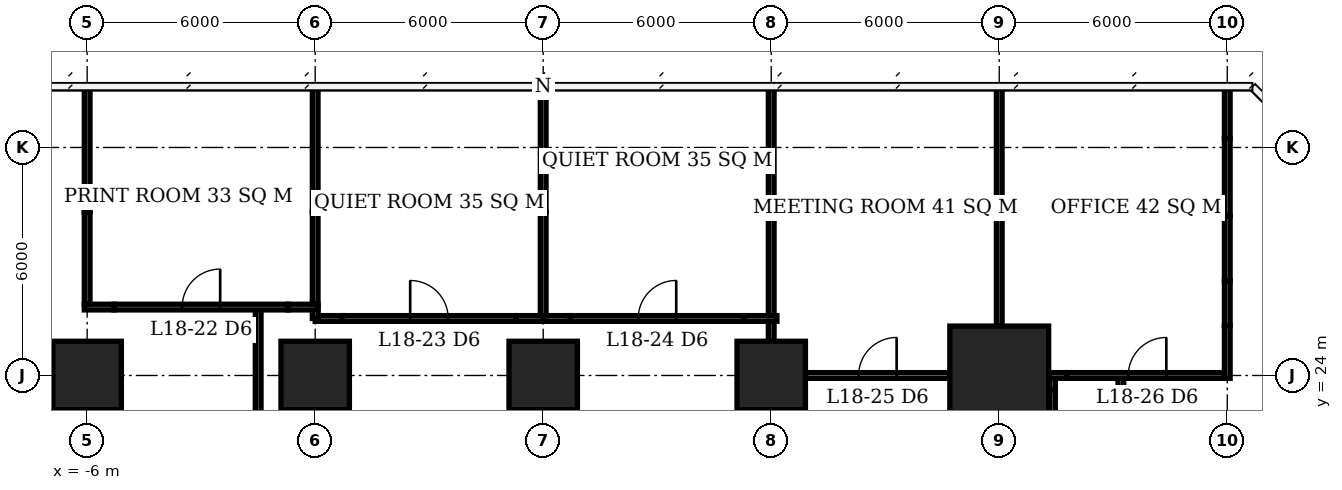
"""IFC4 building model, lengths in metres.
Left out: names, types, materials, properties, quantities, classifications, styles, units other than length and angle.
Written with IfcOpenShell. Run it as: python <this file> out.ifc"""

import sys

from ifc_helpers import new_model, si_unit, direction, frame, frame_2d, origin, origin_2d, place, context, subcontext, project, spatial, rectangle, extrude, element, fill, save


model = new_model("IFC4")
c1 = context("Model", 3, precision=1e-05, world=origin(), true_north=direction((0.0, 1.0)))
c2 = subcontext(c1, "Body", "Model", "MODEL_VIEW")
j1 = project(units=[si_unit("LENGTHUNIT", "METRE"), si_unit("PLANEANGLEUNIT", "RADIAN")], contexts=[c1])
p1 = place(None, origin())
s1 = spatial("IfcSite", under=j1, at=p1, CompositionType="ELEMENT")
p2 = place(p1, origin())
s2 = spatial("IfcBuilding", under=s1, at=p2, CompositionType="ELEMENT")
p3 = place(p2, frame((0.0, 0.0, 76.7)))
s3 = spatial("IfcBuildingStorey", under=s2, at=p3, CompositionType="ELEMENT", Elevation=76.7)
for number, where, z_axis, x_axis in (
    (1, (-6.0, 24.0, 0.0), (0.0, 0.0, 1.0), (1.0, 0.0, 0.0)),
    (2, (0.0, 24.0, 0.0), (0.0, 0.0, 1.0), (1.0, 0.0, 0.0)),
    (3, (6.0, 24.0, 0.0), (0.0, 0.0, 1.0), (1.0, 0.0, 0.0)),
    (4, (12.0, 24.0, 0.0), (0.0, 0.0, 1.0), (1.0, 0.0, 0.0)),
):
    element("IfcColumn", number, at=place(p3, frame(where, z_axis=z_axis, x_axis=x_axis)), inside=s3, PredefinedType="COLUMN", context=c2, shape_type="SweptSolid", body=[
        extrude(rectangle(XDim=1.8, YDim=1.8, at=origin_2d()), origin(), (0.0, 0.0, 1.0), 3.9),
    ])
p4 = place(p3, frame((18.0, 24.0, 0.0), z_axis=(0.0, 0.0, 1.0), x_axis=(1.0, 0.0, 0.0)))
e5 = element("IfcColumn", 5, at=p4, inside=s3, PredefinedType="COLUMN", context=c2, shape_type="SweptSolid", body=[
    extrude(rectangle(XDim=2.6, YDim=2.6, at=origin_2d()), origin(), (0.0, 0.0, 1.0), 3.9),
])
p5 = place(p3, frame((12.9, 24.0, 0.0), z_axis=(0.0, 0.0, 1.0), x_axis=(1.0, 0.0, 0.0)))
e6 = element("IfcWall", 6, at=p5, inside=s3, PredefinedType="PARTITIONING", context=c2, shape_type="SweptSolid", body=[
    extrude(rectangle(XDim=3.8, YDim=0.15, at=frame_2d((1.9, 0.0))), origin(), (0.0, 0.0, 1.0), 3.65),
])
p6 = place(p5, frame((1.4, 0.0, 0.0)))
e7 = element("IfcOpeningElement", 7, at=p6, cuts=e6, PredefinedType="OPENING", context=c2, shape_type="SweptSolid", body=[
    extrude(rectangle(XDim=1.0, YDim=2.1, at=frame_2d((0.5, 1.05))), frame((0.0, 0.085, 0.0), z_axis=(0.0, -1.0, 0.0), x_axis=(1.0, 0.0, 0.0)), (0.0, 0.0, 1.0), 0.17),
])
p7 = place(p3, frame((19.3, 24.0, 0.0), z_axis=(0.0, 0.0, 1.0), x_axis=(1.0, 0.0, 0.0)))
e8 = element("IfcWall", 8, at=p7, inside=s3, PredefinedType="PARTITIONING", context=c2, shape_type="SweptSolid", body=[
    extrude(rectangle(XDim=0.492, YDim=0.15, at=frame_2d((0.246, 0.0))), origin(), (0.0, 0.0, 1.0), 2.65),
])
p8 = place(p3, frame((19.792, 24.0, 0.0), z_axis=(0.0, 0.0, 1.0), x_axis=(1.0, 0.0, 0.0)))
e9 = element("IfcWall", 9, at=p8, inside=s3, PredefinedType="PARTITIONING", context=c2, shape_type="SweptSolid", body=[
    extrude(rectangle(XDim=4.133, YDim=0.15, at=frame_2d((2.066, 0.0))), origin(), (0.0, 0.0, 1.0), 3.65),
])
p9 = place(p8, frame((1.604, 0.0, 0.0)))
e10 = element("IfcOpeningElement", 10, at=p9, cuts=e9, PredefinedType="OPENING", context=c2, shape_type="SweptSolid", body=[
    extrude(rectangle(XDim=1.0, YDim=2.1, at=frame_2d((0.5, 1.05))), frame((0.0, 0.085, 0.0), z_axis=(0.0, -1.0, 0.0), x_axis=(1.0, 0.0, 0.0)), (0.0, 0.0, 1.0), 0.17),
])
p10 = place(p3, frame((0.0, 25.5, 0.0), z_axis=(0.0, 0.0, 1.0), x_axis=(1.0, 0.0, 0.0)))
e11 = element("IfcWall", 11, at=p10, inside=s3, PredefinedType="PARTITIONING", context=c2, shape_type="SweptSolid", body=[
    extrude(rectangle(XDim=0.71, YDim=0.15, at=frame_2d((0.355, 0.0))), origin(), (0.0, 0.0, 1.0), 2.65),
])
p11 = place(p3, frame((0.71, 25.5, 0.0), z_axis=(0.0, 0.0, 1.0), x_axis=(1.0, 0.0, 0.0)))
e12 = element("IfcWall", 12, at=p11, inside=s3, PredefinedType="PARTITIONING", context=c2, shape_type="SweptSolid", body=[
    extrude(rectangle(XDim=4.58, YDim=0.15, at=frame_2d((2.29, 0.0))), origin(), (0.0, 0.0, 1.0), 3.65),
])
p12 = place(p11, frame((1.79, 0.0, 0.0)))
e13 = element("IfcOpeningElement", 13, at=p12, cuts=e12, PredefinedType="OPENING", context=c2, shape_type="SweptSolid", body=[
    extrude(rectangle(XDim=1.0, YDim=2.1, at=frame_2d((0.5, 1.05))), frame((0.0, 0.085, 0.0), z_axis=(0.0, -1.0, 0.0), x_axis=(1.0, 0.0, 0.0)), (0.0, 0.0, 1.0), 0.17),
])
p13 = place(p3, frame((5.29, 25.5, 0.0), z_axis=(0.0, 0.0, 1.0), x_axis=(1.0, 0.0, 0.0)))
e14 = element("IfcWall", 14, at=p13, inside=s3, PredefinedType="PARTITIONING", context=c2, shape_type="SweptSolid", body=[
    extrude(rectangle(XDim=0.785, YDim=0.15, at=frame_2d((0.393, 0.0))), origin(), (0.0, 0.0, 1.0), 2.65),
])
p14 = place(p3, frame((6.0, 25.5, 0.0), z_axis=(0.0, 0.0, 1.0), x_axis=(1.0, 0.0, 0.0)))
e15 = element("IfcWall", 15, at=p14, inside=s3, PredefinedType="PARTITIONING", context=c2, shape_type="SweptSolid", body=[
    extrude(rectangle(XDim=0.71, YDim=0.15, at=frame_2d((0.355, 0.0))), origin(), (0.0, 0.0, 1.0), 2.65),
])
p15 = place(p3, frame((6.71, 25.5, 0.0), z_axis=(0.0, 0.0, 1.0), x_axis=(1.0, 0.0, 0.0)))
e16 = element("IfcWall", 16, at=p15, inside=s3, PredefinedType="PARTITIONING", context=c2, shape_type="SweptSolid", body=[
    extrude(rectangle(XDim=4.58, YDim=0.15, at=frame_2d((2.29, 0.0))), origin(), (0.0, 0.0, 1.0), 3.65),
])
p16 = place(p15, frame((1.79, 0.0, 0.0)))
e17 = element("IfcOpeningElement", 17, at=p16, cuts=e16, PredefinedType="OPENING", context=c2, shape_type="SweptSolid", body=[
    extrude(rectangle(XDim=1.0, YDim=2.1, at=frame_2d((0.5, 1.05))), frame((0.0, 0.085, 0.0), z_axis=(0.0, -1.0, 0.0), x_axis=(1.0, 0.0, 0.0)), (0.0, 0.0, 1.0), 0.17),
])
p17 = place(p3, frame((11.29, 25.5, 0.0), z_axis=(0.0, 0.0, 1.0), x_axis=(1.0, 0.0, 0.0)))
e18 = element("IfcWall", 18, at=p17, inside=s3, PredefinedType="PARTITIONING", context=c2, shape_type="SweptSolid", body=[
    extrude(rectangle(XDim=0.86, YDim=0.15, at=frame_2d((0.43, 0.0))), origin(), (0.0, 0.0, 1.0), 2.65),
])
p18 = place(p3, frame((-6.075, 25.8, 0.0), z_axis=(0.0, 0.0, 1.0), x_axis=(1.0, 0.0, 0.0)))
e19 = element("IfcWall", 19, at=p18, inside=s3, PredefinedType="PARTITIONING", context=c2, shape_type="SweptSolid", body=[
    extrude(rectangle(XDim=0.785, YDim=0.15, at=frame_2d((0.393, 0.0))), origin(), (0.0, 0.0, 1.0), 2.65),
])
p19 = place(p3, frame((-5.29, 25.8, 0.0), z_axis=(0.0, 0.0, 1.0), x_axis=(1.0, 0.0, 0.0)))
e20 = element("IfcWall", 20, at=p19, inside=s3, PredefinedType="PARTITIONING", context=c2, shape_type="SweptSolid", body=[
    extrude(rectangle(XDim=4.58, YDim=0.15, at=frame_2d((2.29, 0.0))), origin(), (0.0, 0.0, 1.0), 3.65),
])
p20 = place(p19, frame((1.79, 0.0, 0.0)))
e21 = element("IfcOpeningElement", 21, at=p20, cuts=e20, PredefinedType="OPENING", context=c2, shape_type="SweptSolid", body=[
    extrude(rectangle(XDim=1.0, YDim=2.1, at=frame_2d((0.5, 1.05))), frame((0.0, 0.085, 0.0), z_axis=(0.0, -1.0, 0.0), x_axis=(1.0, 0.0, 0.0)), (0.0, 0.0, 1.0), 0.17),
])
p21 = place(p3, frame((-0.71, 25.8, 0.0), z_axis=(0.0, 0.0, 1.0), x_axis=(1.0, 0.0, 0.0)))
e22 = element("IfcWall", 22, at=p21, inside=s3, PredefinedType="PARTITIONING", context=c2, shape_type="SweptSolid", body=[
    extrude(rectangle(XDim=0.785, YDim=0.15, at=frame_2d((0.393, 0.0))), origin(), (0.0, 0.0, 1.0), 2.65),
])
p22 = place(p3, frame((-6.0, 25.875, 0.0), z_axis=(0.0, 0.0, 1.0), x_axis=(0.0, 1.0, 0.0)))
e23 = element("IfcWall", 23, at=p22, inside=s3, PredefinedType="PARTITIONING", context=c2, shape_type="SweptSolid", body=[
    extrude(rectangle(XDim=2.435, YDim=0.15, at=frame_2d((1.218, 0.0))), origin(), (0.0, 0.0, 1.0), 2.65),
])
p23 = place(p3, frame((-6.0, 28.31, 0.0), z_axis=(0.0, 0.0, 1.0), x_axis=(0.0, 1.0, 0.0)))
e24 = element("IfcWall", 24, at=p23, inside=s3, PredefinedType="PARTITIONING", context=c2, shape_type="SweptSolid", body=[
    extrude(rectangle(XDim=3.29, YDim=0.15, at=frame_2d((1.645, 0.0))), origin(), (0.0, 0.0, 1.0), 3.65),
])
p24 = place(p3, frame((0.0, 25.5, 0.0), z_axis=(0.0, 0.0, 1.0), x_axis=(0.0, 1.0, 0.0)))
e25 = element("IfcWall", 25, at=p24, inside=s3, PredefinedType="PARTITIONING", context=c2, shape_type="SweptSolid", body=[
    extrude(rectangle(XDim=0.3, YDim=0.15, at=frame_2d((0.15, 0.0))), origin(), (0.0, 0.0, 1.0), 2.65),
])
p25 = place(p3, frame((0.0, 25.875, 0.0), z_axis=(0.0, 0.0, 1.0), x_axis=(0.0, 1.0, 0.0)))
e26 = element("IfcWall", 26, at=p25, inside=s3, PredefinedType="PARTITIONING", context=c2, shape_type="SweptSolid", body=[
    extrude(rectangle(XDim=2.435, YDim=0.15, at=frame_2d((1.218, 0.0))), origin(), (0.0, 0.0, 1.0), 2.65),
])
p26 = place(p3, frame((0.0, 28.31, 0.0), z_axis=(0.0, 0.0, 1.0), x_axis=(0.0, 1.0, 0.0)))
e27 = element("IfcWall", 27, at=p26, inside=s3, PredefinedType="PARTITIONING", context=c2, shape_type="SweptSolid", body=[
    extrude(rectangle(XDim=3.29, YDim=0.15, at=frame_2d((1.645, 0.0))), origin(), (0.0, 0.0, 1.0), 3.65),
])
p27 = place(p3, frame((6.0, 25.575, 0.0), z_axis=(0.0, 0.0, 1.0), x_axis=(0.0, 1.0, 0.0)))
e28 = element("IfcWall", 28, at=p27, inside=s3, PredefinedType="PARTITIONING", context=c2, shape_type="SweptSolid", body=[
    extrude(rectangle(XDim=2.735, YDim=0.15, at=frame_2d((1.368, 0.0))), origin(), (0.0, 0.0, 1.0), 2.65),
])
p28 = place(p3, frame((6.0, 28.31, 0.0), z_axis=(0.0, 0.0, 1.0), x_axis=(0.0, 1.0, 0.0)))
e29 = element("IfcWall", 29, at=p28, inside=s3, PredefinedType="PARTITIONING", context=c2, shape_type="SweptSolid", body=[
    extrude(rectangle(XDim=3.24, YDim=0.15, at=frame_2d((1.62, 0.0))), origin(), (0.0, 0.0, 1.0), 3.65),
])
p29 = place(p3, frame((12.0, 24.9, 0.0), z_axis=(0.0, 0.0, 1.0), x_axis=(0.0, 1.0, 0.0)))
e30 = element("IfcWall", 30, at=p29, inside=s3, PredefinedType="PARTITIONING", context=c2, shape_type="SweptSolid", body=[
    extrude(rectangle(XDim=0.525, YDim=0.15, at=frame_2d((0.263, 0.0))), origin(), (0.0, 0.0, 1.0), 2.65),
])
p30 = place(p3, frame((12.0, 25.575, 0.0), z_axis=(0.0, 0.0, 1.0), x_axis=(0.0, 1.0, 0.0)))
e31 = element("IfcWall", 31, at=p30, inside=s3, PredefinedType="PARTITIONING", context=c2, shape_type="SweptSolid", body=[
    extrude(rectangle(XDim=2.735, YDim=0.15, at=frame_2d((1.368, 0.0))), origin(), (0.0, 0.0, 1.0), 2.65),
])
p31 = place(p3, frame((12.0, 28.31, 0.0), z_axis=(0.0, 0.0, 1.0), x_axis=(0.0, 1.0, 0.0)))
e32 = element("IfcWall", 32, at=p31, inside=s3, PredefinedType="PARTITIONING", context=c2, shape_type="SweptSolid", body=[
    extrude(rectangle(XDim=3.29, YDim=0.15, at=frame_2d((1.645, 0.0))), origin(), (0.0, 0.0, 1.0), 3.65),
])
p32 = place(p3, frame((18.0, 25.3, 0.0), z_axis=(0.0, 0.0, 1.0), x_axis=(0.0, 1.0, 0.0)))
e33 = element("IfcWall", 33, at=p32, inside=s3, PredefinedType="PARTITIONING", context=c2, shape_type="SweptSolid", body=[
    extrude(rectangle(XDim=3.01, YDim=0.15, at=frame_2d((1.505, 0.0))), origin(), (0.0, 0.0, 1.0), 2.65),
])
p33 = place(p3, frame((18.0, 28.31, 0.0), z_axis=(0.0, 0.0, 1.0), x_axis=(0.0, 1.0, 0.0)))
e34 = element("IfcWall", 34, at=p33, inside=s3, PredefinedType="PARTITIONING", context=c2, shape_type="SweptSolid", body=[
    extrude(rectangle(XDim=3.29, YDim=0.15, at=frame_2d((1.645, 0.0))), origin(), (0.0, 0.0, 1.0), 3.65),
])
p34 = place(p3, frame((24.0, 23.925, 0.0), z_axis=(0.0, 0.0, 1.0), x_axis=(0.0, 1.0, 0.0)))
e35 = element("IfcWall", 35, at=p34, inside=s3, PredefinedType="PARTITIONING", context=c2, shape_type="SweptSolid", body=[
    extrude(rectangle(XDim=1.385, YDim=0.15, at=frame_2d((0.692, 0.0))), origin(), (0.0, 0.0, 1.0), 3.65),
])
p35 = place(p3, frame((24.0, 25.31, 0.0), z_axis=(0.0, 0.0, 1.0), x_axis=(0.0, 1.0, 0.0)))
e36 = element("IfcWall", 36, at=p35, inside=s3, PredefinedType="PARTITIONING", context=c2, shape_type="SweptSolid", body=[
    extrude(rectangle(XDim=1.18, YDim=0.15, at=frame_2d((0.59, 0.0))), origin(), (0.0, 0.0, 1.0), 2.65),
])
p36 = place(p3, frame((24.0, 26.49, 0.0), z_axis=(0.0, 0.0, 1.0), x_axis=(0.0, 1.0, 0.0)))
e37 = element("IfcWall", 37, at=p36, inside=s3, PredefinedType="PARTITIONING", context=c2, shape_type="SweptSolid", body=[
    extrude(rectangle(XDim=1.718, YDim=0.15, at=frame_2d((0.859, 0.0))), origin(), (0.0, 0.0, 1.0), 3.65),
])
p37 = place(p3, frame((24.0, 28.208, 0.0), z_axis=(0.0, 0.0, 1.0), x_axis=(0.0, 1.0, 0.0)))
e38 = element("IfcWall", 38, at=p37, inside=s3, PredefinedType="PARTITIONING", context=c2, shape_type="SweptSolid", body=[
    extrude(rectangle(XDim=2.029, YDim=0.15, at=frame_2d((1.015, 0.0))), origin(), (0.0, 0.0, 1.0), 2.65),
])
p38 = place(p3, frame((24.0, 30.237, 0.0), z_axis=(0.0, 0.0, 1.0), x_axis=(0.0, 1.0, 0.0)))
e39 = element("IfcWall", 39, at=p38, inside=s3, PredefinedType="PARTITIONING", context=c2, shape_type="SweptSolid", body=[
    extrude(rectangle(XDim=1.363, YDim=0.15, at=frame_2d((0.682, 0.0))), origin(), (0.0, 0.0, 1.0), 3.65),
])
p39 = place(p3, frame((-1.5, 13.6, 0.0), z_axis=(0.0, 0.0, 1.0), x_axis=(0.0, 1.0, 0.0)))
e40 = element("IfcWall", 40, at=p39, inside=s3, PredefinedType="PARTITIONING", context=c2, shape_type="SweptSolid", body=[
    extrude(rectangle(XDim=12.125, YDim=0.15, at=frame_2d((6.062, 0.0))), origin(), (0.0, 0.0, 1.0), 3.65),
])
p40 = place(p3, frame((19.4, 16.0, 0.0), z_axis=(0.0, 0.0, 1.0), x_axis=(0.0, 1.0, 0.0)))
e41 = element("IfcWall", 41, at=p40, inside=s3, PredefinedType="PARTITIONING", context=c2, shape_type="SweptSolid", body=[
    extrude(rectangle(XDim=7.608, YDim=0.15, at=frame_2d((3.804, 0.0))), origin(), (0.0, 0.0, 1.0), 3.65),
])
p41 = place(p40, frame((2.95, 0.0, 0.0)))
e42 = element("IfcOpeningElement", 42, at=p41, cuts=e41, PredefinedType="OPENING", context=c2, shape_type="SweptSolid", body=[
    extrude(rectangle(XDim=1.0, YDim=2.1, at=frame_2d((0.5, 1.05))), frame((0.0, 0.085, 0.0), z_axis=(0.0, -1.0, 0.0), x_axis=(1.0, 0.0, 0.0)), (0.0, 0.0, 1.0), 0.17),
])
p42 = place(p3, frame((19.4, 23.608, 0.0), z_axis=(0.0, 0.0, 1.0), x_axis=(0.0, 1.0, 0.0)))
e43 = element("IfcWall", 43, at=p42, inside=s3, PredefinedType="PARTITIONING", context=c2, shape_type="SweptSolid", body=[
    extrude(rectangle(XDim=0.317, YDim=0.15, at=frame_2d((0.159, 0.0))), origin(), (0.0, 0.0, 1.0), 2.65),
])
p43 = place(p3, frame((21.2, -4.425, 0.0), z_axis=(0.0, 0.0, 1.0), x_axis=(0.0, 1.0, 0.0)))
e44 = element("IfcWall", 44, at=p43, inside=s3, PredefinedType="PARTITIONING", context=c2, shape_type="SweptSolid", body=[
    extrude(rectangle(XDim=28.35, YDim=0.15, at=frame_2d((14.175, 0.0))), origin(), (0.0, 0.0, 1.0), 3.65),
])
p44 = place(p43, frame((17.901, 0.0, 0.0)))
e45 = element("IfcOpeningElement", 45, at=p44, cuts=e44, PredefinedType="OPENING", context=c2, shape_type="SweptSolid", body=[
    extrude(rectangle(XDim=1.0, YDim=2.1, at=frame_2d((0.5, 1.05))), frame((0.0, 0.085, 0.0), z_axis=(0.0, -1.0, 0.0), x_axis=(1.0, 0.0, 0.0)), (0.0, 0.0, 1.0), 0.17),
])
p45 = place(p20, origin())
e46 = element("IfcDoor", 46, at=p45, inside=s3, OperationType="SINGLE_SWING_RIGHT", PredefinedType="DOOR", context=c2, shape_type="SweptSolid", body=[
    extrude(rectangle(XDim=1.0, YDim=2.1, at=frame_2d((0.5, 1.05))), frame((0.0, 0.025, 0.0), z_axis=(0.0, -1.0, 0.0), x_axis=(1.0, 0.0, 0.0)), (0.0, 0.0, 1.0), 0.05),
])
fill(e21, e46)
p46 = place(p12, origin())
e47 = element("IfcDoor", 47, at=p46, inside=s3, OperationType="SINGLE_SWING_LEFT", PredefinedType="DOOR", context=c2, shape_type="SweptSolid", body=[
    extrude(rectangle(XDim=1.0, YDim=2.1, at=frame_2d((0.5, 1.05))), frame((0.0, 0.025, 0.0), z_axis=(0.0, -1.0, 0.0), x_axis=(1.0, 0.0, 0.0)), (0.0, 0.0, 1.0), 0.05),
])
fill(e13, e47)
p47 = place(p16, origin())
e48 = element("IfcDoor", 48, at=p47, inside=s3, OperationType="SINGLE_SWING_RIGHT", PredefinedType="DOOR", context=c2, shape_type="SweptSolid", body=[
    extrude(rectangle(XDim=1.0, YDim=2.1, at=frame_2d((0.5, 1.05))), frame((0.0, 0.025, 0.0), z_axis=(0.0, -1.0, 0.0), x_axis=(1.0, 0.0, 0.0)), (0.0, 0.0, 1.0), 0.05),
])
fill(e17, e48)
p48 = place(p6, origin())
e49 = element("IfcDoor", 49, at=p48, inside=s3, OperationType="SINGLE_SWING_RIGHT", PredefinedType="DOOR", context=c2, shape_type="SweptSolid", body=[
    extrude(rectangle(XDim=1.0, YDim=2.1, at=frame_2d((0.5, 1.05))), frame((0.0, 0.025, 0.0), z_axis=(0.0, -1.0, 0.0), x_axis=(1.0, 0.0, 0.0)), (0.0, 0.0, 1.0), 0.05),
])
fill(e7, e49)
p49 = place(p9, origin())
e50 = element("IfcDoor", 50, at=p49, inside=s3, OperationType="SINGLE_SWING_RIGHT", PredefinedType="DOOR", context=c2, shape_type="SweptSolid", body=[
    extrude(rectangle(XDim=1.0, YDim=2.1, at=frame_2d((0.5, 1.05))), frame((0.0, 0.025, 0.0), z_axis=(0.0, -1.0, 0.0), x_axis=(1.0, 0.0, 0.0)), (0.0, 0.0, 1.0), 0.05),
])
fill(e10, e50)
save(model, sys.argv[1])
